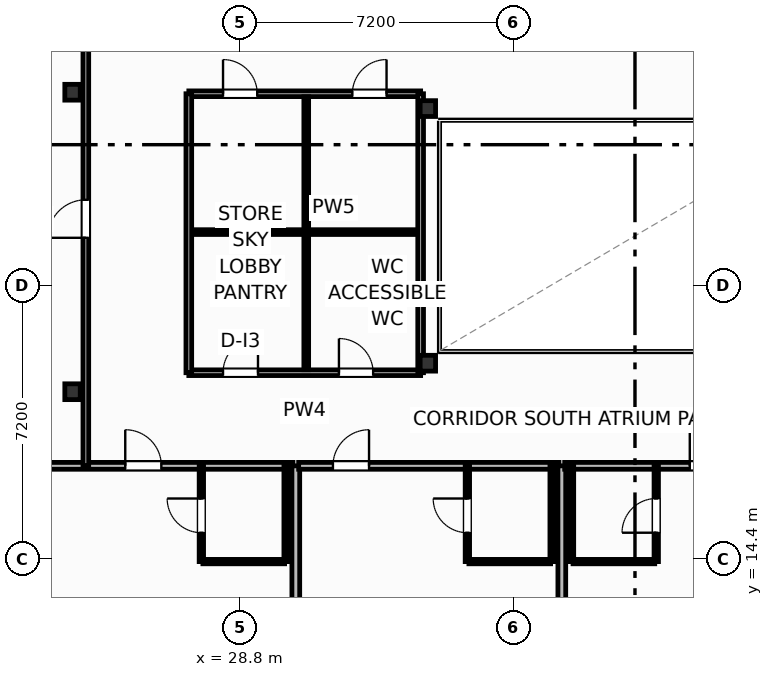
"""IFC4 building model, lengths in metres.
Left out: names, types, materials, properties, quantities, classifications, styles, units other than length and angle.
Written with IfcOpenShell. Run it as: python <this file> out.ifc"""

import sys

from ifc_helpers import new_model, si_unit, direction, frame, frame_2d, origin, origin_2d, place, context, subcontext, project, spatial, rectangle, i_section, extrude, element, fill, save


model = new_model("IFC4")
c1 = context("Model", 3, precision=1e-05, world=origin(), true_north=direction((0.0, 1.0)))
c2 = subcontext(c1, "Body", "Model", "MODEL_VIEW")
j1 = project(units=[si_unit("LENGTHUNIT", "METRE"), si_unit("PLANEANGLEUNIT", "RADIAN")], contexts=[c1])
p1 = place(None, origin())
s1 = spatial("IfcSite", under=j1, at=p1, CompositionType="ELEMENT")
p2 = place(p1, origin())
s2 = spatial("IfcBuilding", under=s1, at=p2, CompositionType="ELEMENT")
p3 = place(p2, frame((0.0, 0.0, 284.1)))
s3 = spatial("IfcBuildingStorey", under=s2, at=p3, CompositionType="ELEMENT", Elevation=284.1)
for number, where, z_axis, x_axis in (
    (1, (33.75, 19.55, 0.0), (0.0, 0.0, 1.0), (1.0, 0.0, 0.0)),
    (2, (33.75, 26.25, 0.0), (0.0, 0.0, 1.0), (1.0, 0.0, 0.0)),
    (3, (24.4, 18.8, 0.0), (0.0, 0.0, 1.0), (1.0, 0.0, 0.0)),
    (4, (24.4, 26.68, 0.0), (0.0, 0.0, 1.0), (1.0, 0.0, 0.0)),
):
    element("IfcColumn", number, at=place(p3, frame(where, z_axis=z_axis, x_axis=x_axis)), inside=s3, PredefinedType="COLUMN", context=c2, shape_type="SweptSolid", body=[
        extrude(i_section(OverallWidth=0.406, OverallDepth=0.416, WebThickness=0.03, FlangeThickness=0.048, FilletRadius=0.025, at=origin_2d()), origin(), (0.0, 0.0, 1.0), 3.7),
    ])
p4 = place(p3, frame((27.46, 26.64, 0.0), z_axis=(0.0, 0.0, 1.0), x_axis=(1.0, 0.0, 0.0)))
e5 = element("IfcWall", 5, at=p4, inside=s3, PredefinedType="PARTITIONING", context=c2, shape_type="SweptSolid", body=[
    extrude(rectangle(XDim=6.1, YDim=0.15, at=frame_2d((3.05, 0.0))), origin(), (0.0, 0.0, 1.0), 2.662),
])
p5 = place(p4, frame((0.9, 0.0, 0.0)))
e6 = element("IfcOpeningElement", 6, at=p5, cuts=e5, PredefinedType="OPENING", context=c2, shape_type="SweptSolid", body=[
    extrude(rectangle(XDim=0.9, YDim=2.05, at=frame_2d((0.45, 1.025))), frame((0.0, 0.085, 0.0), z_axis=(0.0, -1.0, 0.0), x_axis=(1.0, 0.0, 0.0)), (0.0, 0.0, 1.0), 0.17),
])
p6 = place(p4, frame((4.303, 0.0, 0.0)))
e7 = element("IfcOpeningElement", 7, at=p6, cuts=e5, PredefinedType="OPENING", context=c2, shape_type="SweptSolid", body=[
    extrude(rectangle(XDim=0.9, YDim=2.05, at=frame_2d((0.45, 1.025))), frame((0.0, 0.085, 0.0), z_axis=(0.0, -1.0, 0.0), x_axis=(1.0, 0.0, 0.0)), (0.0, 0.0, 1.0), 0.17),
])
p7 = place(p3, frame((27.46, 19.3, 0.0), z_axis=(0.0, 0.0, 1.0), x_axis=(1.0, 0.0, 0.0)))
e8 = element("IfcWall", 8, at=p7, inside=s3, PredefinedType="PARTITIONING", context=c2, shape_type="SweptSolid", body=[
    extrude(rectangle(XDim=6.1, YDim=0.15, at=frame_2d((3.05, 0.0))), origin(), (0.0, 0.0, 1.0), 2.662),
])
p8 = place(p7, frame((0.9, 0.0, 0.0)))
e9 = element("IfcOpeningElement", 9, at=p8, cuts=e8, PredefinedType="OPENING", context=c2, shape_type="SweptSolid", body=[
    extrude(rectangle(XDim=0.92, YDim=2.05, at=frame_2d((0.46, 1.025))), frame((0.0, 0.085, 0.0), z_axis=(0.0, -1.0, 0.0), x_axis=(1.0, 0.0, 0.0)), (0.0, 0.0, 1.0), 0.17),
])
p9 = place(p7, frame((3.95, 0.0, 0.0)))
e10 = element("IfcOpeningElement", 10, at=p9, cuts=e8, PredefinedType="OPENING", context=c2, shape_type="SweptSolid", body=[
    extrude(rectangle(XDim=0.9, YDim=2.05, at=frame_2d((0.45, 1.025))), frame((0.0, 0.085, 0.0), z_axis=(0.0, -1.0, 0.0), x_axis=(1.0, 0.0, 0.0)), (0.0, 0.0, 1.0), 0.17),
])
p10 = place(p3, frame((30.55, 19.38, 0.0), z_axis=(0.0, 0.0, 1.0), x_axis=(0.0, 1.0, 0.0)))
e11 = element("IfcWall", 11, at=p10, inside=s3, PredefinedType="PARTITIONING", context=c2, shape_type="SweptSolid", body=[
    extrude(rectangle(XDim=7.18, YDim=0.125, at=frame_2d((3.59, 0.0))), origin(), (0.0, 0.0, 1.0), 3.45),
])
p11 = place(p3, frame((27.52, 23.0, 0.0), z_axis=(0.0, 0.0, 1.0), x_axis=(1.0, 0.0, 0.0)))
e12 = element("IfcWall", 12, at=p11, inside=s3, PredefinedType="PARTITIONING", context=c2, shape_type="SweptSolid", body=[
    extrude(rectangle(XDim=6.0, YDim=0.125, at=frame_2d((3.0, 0.0))), origin(), (0.0, 0.0, 1.0), 3.45),
])
p12 = place(p3, frame((27.46, 19.3, 0.0), z_axis=(0.0, 0.0, 1.0), x_axis=(0.0, 1.0, 0.0)))
e13 = element("IfcWall", 13, at=p12, inside=s3, PredefinedType="PARTITIONING", context=c2, shape_type="SweptSolid", body=[
    extrude(rectangle(XDim=7.34, YDim=0.15, at=frame_2d((3.67, 0.0))), origin(), (0.0, 0.0, 1.0), 3.45),
])
p13 = place(p3, frame((33.56, 19.3, 0.0), z_axis=(0.0, 0.0, 1.0), x_axis=(0.0, 1.0, 0.0)))
e14 = element("IfcWall", 14, at=p13, inside=s3, PredefinedType="PARTITIONING", context=c2, shape_type="SweptSolid", body=[
    extrude(rectangle(XDim=7.34, YDim=0.15, at=frame_2d((3.67, 0.0))), origin(), (0.0, 0.0, 1.0), 2.824),
])
p14 = place(p3, frame((23.35, 16.85, 0.0), z_axis=(0.0, 0.0, 1.0), x_axis=(1.0, 0.0, 0.0)))
e15 = element("IfcWall", 15, at=p14, inside=s3, PredefinedType="PARTITIONING", context=c2, shape_type="SweptSolid", body=[
    extrude(rectangle(XDim=6.85, YDim=0.18, at=frame_2d((3.425, 0.0))), origin(), (0.0, 0.0, 1.0), 3.45),
])
p15 = place(p14, frame((2.437, 0.0, 0.0)))
e16 = element("IfcOpeningElement", 16, at=p15, cuts=e15, PredefinedType="OPENING", context=c2, shape_type="SweptSolid", body=[
    extrude(rectangle(XDim=0.95, YDim=2.15, at=frame_2d((0.475, 1.075))), frame((0.0, 0.1, 0.0), z_axis=(0.0, -1.0, 0.0), x_axis=(1.0, 0.0, 0.0)), (0.0, 0.0, 1.0), 0.2),
])
p16 = place(p3, frame((27.83, 14.33, 0.0), z_axis=(0.0, 0.0, 1.0), x_axis=(1.0, 0.0, 0.0)))
e17 = element("IfcWall", 17, at=p16, inside=s3, PredefinedType="PARTITIONING", context=c2, shape_type="SweptSolid", body=[
    extrude(rectangle(XDim=2.15, YDim=0.115, at=frame_2d((1.075, 0.0))), origin(), (0.0, 0.0, 1.0), 3.45),
])
p17 = place(p3, frame((27.79, 14.33, 0.0), z_axis=(0.0, 0.0, 1.0), x_axis=(0.0, 1.0, 0.0)))
e18 = element("IfcWall", 18, at=p17, inside=s3, PredefinedType="PARTITIONING", context=c2, shape_type="SweptSolid", body=[
    extrude(rectangle(XDim=2.52, YDim=0.115, at=frame_2d((1.26, 0.0))), origin(), (0.0, 0.0, 1.0), 3.45),
])
p18 = place(p17, frame((0.76, 0.0, 0.0)))
e19 = element("IfcOpeningElement", 19, at=p18, cuts=e18, PredefinedType="OPENING", context=c2, shape_type="SweptSolid", body=[
    extrude(rectangle(XDim=0.9, YDim=2.05, at=frame_2d((0.45, 1.025))), frame((0.0, 0.067, 0.0), z_axis=(0.0, -1.0, 0.0), x_axis=(1.0, 0.0, 0.0)), (0.0, 0.0, 1.0), 0.135),
])
p19 = place(p3, frame((30.02, 14.33, 0.0), z_axis=(0.0, 0.0, 1.0), x_axis=(0.0, 1.0, 0.0)))
e20 = element("IfcWall", 20, at=p19, inside=s3, PredefinedType="PARTITIONING", context=c2, shape_type="SweptSolid", body=[
    extrude(rectangle(XDim=2.52, YDim=0.115, at=frame_2d((1.26, 0.0))), origin(), (0.0, 0.0, 1.0), 3.45),
])
p20 = place(p3, frame((30.275, -5.611, 0.0), z_axis=(0.0, 0.0, 1.0), x_axis=(0.0, 1.0, 0.0)))
e21 = element("IfcWall", 21, at=p20, inside=s3, PredefinedType="PARTITIONING", context=c2, shape_type="SweptSolid", body=[
    extrude(rectangle(XDim=22.461, YDim=0.205, at=frame_2d((11.23, 0.0))), origin(), (0.0, 0.0, 1.0), 3.45),
])
p21 = place(p3, frame((30.35, 16.85, 0.0), z_axis=(0.0, 0.0, 1.0), x_axis=(1.0, 0.0, 0.0)))
e22 = element("IfcWall", 22, at=p21, inside=s3, PredefinedType="PARTITIONING", context=c2, shape_type="SweptSolid", body=[
    extrude(rectangle(XDim=6.85, YDim=0.18, at=frame_2d((3.425, 0.0))), origin(), (0.0, 0.0, 1.0), 3.45),
])
p22 = place(p21, frame((0.902, 0.0, 0.0)))
e23 = element("IfcOpeningElement", 23, at=p22, cuts=e22, PredefinedType="OPENING", context=c2, shape_type="SweptSolid", body=[
    extrude(rectangle(XDim=0.95, YDim=2.15, at=frame_2d((0.475, 1.075))), frame((0.0, 0.1, 0.0), z_axis=(0.0, -1.0, 0.0), x_axis=(1.0, 0.0, 0.0)), (0.0, 0.0, 1.0), 0.2),
])
p23 = place(p3, frame((34.83, 14.33, 0.0), z_axis=(0.0, 0.0, 1.0), x_axis=(1.0, 0.0, 0.0)))
e24 = element("IfcWall", 24, at=p23, inside=s3, PredefinedType="PARTITIONING", context=c2, shape_type="SweptSolid", body=[
    extrude(rectangle(XDim=2.15, YDim=0.115, at=frame_2d((1.075, 0.0))), origin(), (0.0, 0.0, 1.0), 3.45),
])
p24 = place(p3, frame((34.79, 14.33, 0.0), z_axis=(0.0, 0.0, 1.0), x_axis=(0.0, 1.0, 0.0)))
e25 = element("IfcWall", 25, at=p24, inside=s3, PredefinedType="PARTITIONING", context=c2, shape_type="SweptSolid", body=[
    extrude(rectangle(XDim=2.52, YDim=0.115, at=frame_2d((1.26, 0.0))), origin(), (0.0, 0.0, 1.0), 3.45),
])
p25 = place(p24, frame((0.76, 0.0, 0.0)))
e26 = element("IfcOpeningElement", 26, at=p25, cuts=e25, PredefinedType="OPENING", context=c2, shape_type="SweptSolid", body=[
    extrude(rectangle(XDim=0.9, YDim=2.05, at=frame_2d((0.45, 1.025))), frame((0.0, 0.067, 0.0), z_axis=(0.0, -1.0, 0.0), x_axis=(1.0, 0.0, 0.0)), (0.0, 0.0, 1.0), 0.135),
])
p26 = place(p3, frame((37.02, 14.33, 0.0), z_axis=(0.0, 0.0, 1.0), x_axis=(0.0, 1.0, 0.0)))
e27 = element("IfcWall", 27, at=p26, inside=s3, PredefinedType="PARTITIONING", context=c2, shape_type="SweptSolid", body=[
    extrude(rectangle(XDim=2.52, YDim=0.115, at=frame_2d((1.26, 0.0))), origin(), (0.0, 0.0, 1.0), 3.45),
])
p27 = place(p3, frame((37.275, 1.68, 0.0), z_axis=(0.0, 0.0, 1.0), x_axis=(0.0, 1.0, 0.0)))
e28 = element("IfcWall", 28, at=p27, inside=s3, PredefinedType="PARTITIONING", context=c2, shape_type="SweptSolid", body=[
    extrude(rectangle(XDim=15.17, YDim=0.205, at=frame_2d((7.585, 0.0))), origin(), (0.0, 0.0, 1.0), 3.45),
])
p28 = place(p3, frame((37.35, 16.85, 0.0), z_axis=(0.0, 0.0, 1.0), x_axis=(1.0, 0.0, 0.0)))
e29 = element("IfcWall", 29, at=p28, inside=s3, PredefinedType="PARTITIONING", context=c2, shape_type="SweptSolid", body=[
    extrude(rectangle(XDim=6.85, YDim=0.18, at=frame_2d((3.425, 0.0))), origin(), (0.0, 0.0, 1.0), 3.45),
])
p29 = place(p28, frame((3.292, 0.0, 0.0)))
e30 = element("IfcOpeningElement", 30, at=p29, cuts=e29, PredefinedType="OPENING", context=c2, shape_type="SweptSolid", body=[
    extrude(rectangle(XDim=0.95, YDim=2.15, at=frame_2d((0.475, 1.075))), frame((0.0, 0.1, 0.0), z_axis=(0.0, -1.0, 0.0), x_axis=(1.0, 0.0, 0.0)), (0.0, 0.0, 1.0), 0.2),
])
p30 = place(p3, frame((37.57, 14.33, 0.0), z_axis=(0.0, 0.0, 1.0), x_axis=(1.0, 0.0, 0.0)))
e31 = element("IfcWall", 31, at=p30, inside=s3, PredefinedType="PARTITIONING", context=c2, shape_type="SweptSolid", body=[
    extrude(rectangle(XDim=2.15, YDim=0.115, at=frame_2d((1.075, 0.0))), origin(), (0.0, 0.0, 1.0), 3.45),
])
p31 = place(p3, frame((39.76, 14.33, 0.0), z_axis=(0.0, 0.0, 1.0), x_axis=(0.0, 1.0, 0.0)))
e32 = element("IfcWall", 32, at=p31, inside=s3, PredefinedType="PARTITIONING", context=c2, shape_type="SweptSolid", body=[
    extrude(rectangle(XDim=2.52, YDim=0.115, at=frame_2d((1.26, 0.0))), origin(), (0.0, 0.0, 1.0), 3.45),
])
p32 = place(p31, frame((0.76, 0.0, 0.0)))
e33 = element("IfcOpeningElement", 33, at=p32, cuts=e32, PredefinedType="OPENING", context=c2, shape_type="SweptSolid", body=[
    extrude(rectangle(XDim=0.9, YDim=2.05, at=frame_2d((0.45, 1.025))), frame((0.0, 0.067, 0.0), z_axis=(0.0, -1.0, 0.0), x_axis=(1.0, 0.0, 0.0)), (0.0, 0.0, 1.0), 0.135),
])
p33 = place(p3, frame((37.53, 14.33, 0.0), z_axis=(0.0, 0.0, 1.0), x_axis=(0.0, 1.0, 0.0)))
e34 = element("IfcWall", 34, at=p33, inside=s3, PredefinedType="PARTITIONING", context=c2, shape_type="SweptSolid", body=[
    extrude(rectangle(XDim=2.52, YDim=0.115, at=frame_2d((1.26, 0.0))), origin(), (0.0, 0.0, 1.0), 3.45),
])
p34 = place(p3, frame((24.75, 16.85, 0.0), z_axis=(0.0, 0.0, 1.0), x_axis=(0.0, 1.0, 0.0)))
e35 = element("IfcWall", 35, at=p34, inside=s3, PredefinedType="PARTITIONING", context=c2, shape_type="SweptSolid", body=[
    extrude(rectangle(XDim=23.325, YDim=0.15, at=frame_2d((11.663, 0.0))), origin(), (0.0, 0.0, 1.0), 3.45),
])
p35 = place(p34, frame((6.0, 0.0, 0.0)))
e36 = element("IfcOpeningElement", 36, at=p35, cuts=e35, PredefinedType="OPENING", context=c2, shape_type="SweptSolid", body=[
    extrude(rectangle(XDim=1.0, YDim=2.05, at=frame_2d((0.5, 1.025))), frame((0.0, 0.085, 0.0), z_axis=(0.0, -1.0, 0.0), x_axis=(1.0, 0.0, 0.0)), (0.0, 0.0, 1.0), 0.17),
])
p36 = place(p5, origin())
e37 = element("IfcDoor", 37, at=p36, inside=s3, OperationType="SINGLE_SWING_LEFT", PredefinedType="DOOR", context=c2, shape_type="SweptSolid", body=[
    extrude(rectangle(XDim=0.9, YDim=2.05, at=frame_2d((0.45, 1.025))), frame((0.0, 0.025, 0.0), z_axis=(0.0, -1.0, 0.0), x_axis=(1.0, 0.0, 0.0)), (0.0, 0.0, 1.0), 0.05),
])
fill(e6, e37)
p37 = place(p6, origin())
e38 = element("IfcDoor", 38, at=p37, inside=s3, OperationType="SINGLE_SWING_RIGHT", PredefinedType="DOOR", context=c2, shape_type="SweptSolid", body=[
    extrude(rectangle(XDim=0.9, YDim=2.05, at=frame_2d((0.45, 1.025))), frame((0.0, 0.025, 0.0), z_axis=(0.0, -1.0, 0.0), x_axis=(1.0, 0.0, 0.0)), (0.0, 0.0, 1.0), 0.05),
])
fill(e7, e38)
p38 = place(p8, origin())
e39 = element("IfcDoor", 39, at=p38, inside=s3, OperationType="SINGLE_SWING_RIGHT", PredefinedType="DOOR", context=c2, shape_type="SweptSolid", body=[
    extrude(rectangle(XDim=0.92, YDim=2.05, at=frame_2d((0.46, 1.025))), frame((0.0, 0.025, 0.0), z_axis=(0.0, -1.0, 0.0), x_axis=(1.0, 0.0, 0.0)), (0.0, 0.0, 1.0), 0.05),
])
fill(e9, e39)
p39 = place(p9, origin())
e40 = element("IfcDoor", 40, at=p39, inside=s3, OperationType="SINGLE_SWING_LEFT", PredefinedType="DOOR", context=c2, shape_type="SweptSolid", body=[
    extrude(rectangle(XDim=0.9, YDim=2.05, at=frame_2d((0.45, 1.025))), frame((0.0, 0.025, 0.0), z_axis=(0.0, -1.0, 0.0), x_axis=(1.0, 0.0, 0.0)), (0.0, 0.0, 1.0), 0.05),
])
fill(e10, e40)
p40 = place(p15, origin())
e41 = element("IfcDoor", 41, at=p40, inside=s3, OperationType="SINGLE_SWING_LEFT", PredefinedType="DOOR", context=c2, shape_type="SweptSolid", body=[
    extrude(rectangle(XDim=0.95, YDim=2.15, at=frame_2d((0.475, 1.075))), frame((0.0, 0.025, 0.0), z_axis=(0.0, -1.0, 0.0), x_axis=(1.0, 0.0, 0.0)), (0.0, 0.0, 1.0), 0.05),
])
fill(e16, e41)
p41 = place(p18, origin())
e42 = element("IfcDoor", 42, at=p41, inside=s3, OperationType="SINGLE_SWING_RIGHT", PredefinedType="DOOR", context=c2, shape_type="SweptSolid", body=[
    extrude(rectangle(XDim=0.9, YDim=2.05, at=frame_2d((0.45, 1.025))), frame((0.0, 0.025, 0.0), z_axis=(0.0, -1.0, 0.0), x_axis=(1.0, 0.0, 0.0)), (0.0, 0.0, 1.0), 0.05),
])
fill(e19, e42)
p42 = place(p22, origin())
e43 = element("IfcDoor", 43, at=p42, inside=s3, OperationType="SINGLE_SWING_RIGHT", PredefinedType="DOOR", context=c2, shape_type="SweptSolid", body=[
    extrude(rectangle(XDim=0.95, YDim=2.15, at=frame_2d((0.475, 1.075))), frame((0.0, 0.025, 0.0), z_axis=(0.0, -1.0, 0.0), x_axis=(1.0, 0.0, 0.0)), (0.0, 0.0, 1.0), 0.05),
])
fill(e23, e43)
p43 = place(p25, origin())
e44 = element("IfcDoor", 44, at=p43, inside=s3, OperationType="SINGLE_SWING_RIGHT", PredefinedType="DOOR", context=c2, shape_type="SweptSolid", body=[
    extrude(rectangle(XDim=0.9, YDim=2.05, at=frame_2d((0.45, 1.025))), frame((0.0, 0.025, 0.0), z_axis=(0.0, -1.0, 0.0), x_axis=(1.0, 0.0, 0.0)), (0.0, 0.0, 1.0), 0.05),
])
fill(e26, e44)
p44 = place(p29, origin())
e45 = element("IfcDoor", 45, at=p44, inside=s3, OperationType="SINGLE_SWING_LEFT", PredefinedType="DOOR", context=c2, shape_type="SweptSolid", body=[
    extrude(rectangle(XDim=0.95, YDim=2.15, at=frame_2d((0.475, 1.075))), frame((0.0, 0.025, 0.0), z_axis=(0.0, -1.0, 0.0), x_axis=(1.0, 0.0, 0.0)), (0.0, 0.0, 1.0), 0.05),
])
fill(e30, e45)
p45 = place(p32, origin())
e46 = element("IfcDoor", 46, at=p45, inside=s3, OperationType="SINGLE_SWING_LEFT", PredefinedType="DOOR", context=c2, shape_type="SweptSolid", body=[
    extrude(rectangle(XDim=0.9, YDim=2.05, at=frame_2d((0.45, 1.025))), frame((0.0, 0.025, 0.0), z_axis=(0.0, -1.0, 0.0), x_axis=(1.0, 0.0, 0.0)), (0.0, 0.0, 1.0), 0.05),
])
fill(e33, e46)
p46 = place(p35, origin())
e47 = element("IfcDoor", 47, at=p46, inside=s3, OperationType="SINGLE_SWING_LEFT", PredefinedType="DOOR", context=c2, shape_type="SweptSolid", body=[
    extrude(rectangle(XDim=1.0, YDim=2.05, at=frame_2d((0.5, 1.025))), frame((0.0, 0.025, 0.0), z_axis=(0.0, -1.0, 0.0), x_axis=(1.0, 0.0, 0.0)), (0.0, 0.0, 1.0), 0.05),
])
fill(e36, e47)
save(model, sys.argv[1])
